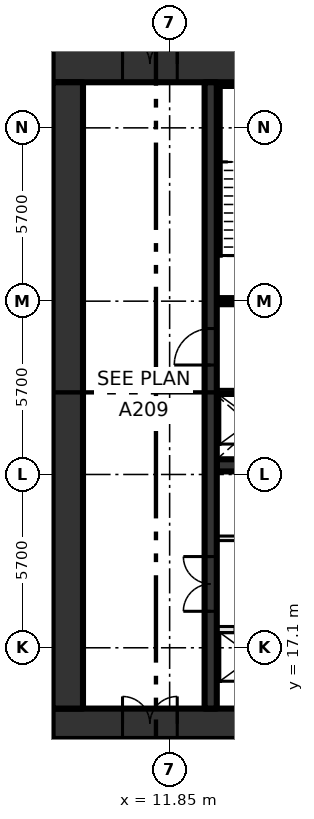
"""IFC4 building model, lengths in metres.
Left out: names, types, materials, properties, quantities, classifications, styles, units other than length and angle.
Written with IfcOpenShell. Run it as: python <this file> out.ifc"""

import sys

from ifc_helpers import new_model, si_unit, direction, frame, frame_2d, origin, place, context, subcontext, project, spatial, rectangle, extrude, element, fill, save


model = new_model("IFC4")
c1 = context("Model", 3, precision=1e-05, world=origin(), true_north=direction((0.0, 1.0)))
c2 = subcontext(c1, "Body", "Model", "MODEL_VIEW")
j1 = project(units=[si_unit("LENGTHUNIT", "METRE"), si_unit("PLANEANGLEUNIT", "RADIAN")], contexts=[c1])
p1 = place(None, origin())
s1 = spatial("IfcSite", under=j1, at=p1, CompositionType="ELEMENT")
p2 = place(p1, origin())
s2 = spatial("IfcBuilding", under=s1, at=p2, CompositionType="ELEMENT")
p3 = place(p2, frame((0.0, 0.0, 33.0)))
s3 = spatial("IfcBuildingStorey", under=s2, at=p3, CompositionType="ELEMENT", Elevation=33.0)
p4 = place(p3, frame((8.0, 14.6, -0.45), z_axis=(0.0, 0.0, 1.0), x_axis=(1.0, 0.0, 0.0)))
e1 = element("IfcWall", 1, at=p4, inside=s3, PredefinedType="SHEAR", context=c2, shape_type="SweptSolid", body=[
    extrude(rectangle(XDim=22.8, YDim=1.0, at=frame_2d((11.4, 0.0))), origin(), (0.0, 0.0, 1.0), 4.35),
])
p5 = place(p4, frame((2.3, 0.0, 0.45)))
e2 = element("IfcOpeningElement", 2, at=p5, cuts=e1, PredefinedType="OPENING", context=c2, shape_type="SweptSolid", body=[
    extrude(rectangle(XDim=1.8, YDim=2.1, at=frame_2d((0.9, 1.05))), frame((0.0, 0.51, 0.0), z_axis=(0.0, -1.0, 0.0), x_axis=(1.0, 0.0, 0.0)), (0.0, 0.0, 1.0), 1.02),
])
p6 = place(p3, frame((8.0, 36.3, -0.45), z_axis=(0.0, 0.0, 1.0), x_axis=(1.0, 0.0, 0.0)))
e3 = element("IfcWall", 3, at=p6, inside=s3, PredefinedType="SHEAR", context=c2, shape_type="SweptSolid", body=[
    extrude(rectangle(XDim=22.8, YDim=1.2, at=frame_2d((11.4, 0.0))), origin(), (0.0, 0.0, 1.0), 4.35),
])
p7 = place(p6, frame((2.3, 0.0, 0.45)))
e4 = element("IfcOpeningElement", 4, at=p7, cuts=e3, PredefinedType="OPENING", context=c2, shape_type="SweptSolid", body=[
    extrude(rectangle(XDim=1.8, YDim=2.1, at=frame_2d((0.9, 1.05))), frame((0.0, 0.61, 0.0), z_axis=(0.0, -1.0, 0.0), x_axis=(1.0, 0.0, 0.0)), (0.0, 0.0, 1.0), 1.22),
])
p8 = place(p3, frame((8.5, 15.1, -0.45), z_axis=(0.0, 0.0, 1.0), x_axis=(0.0, 1.0, 0.0)))
e5 = element("IfcWall", 5, at=p8, inside=s3, PredefinedType="SHEAR", context=c2, shape_type="SweptSolid", body=[
    extrude(rectangle(XDim=20.6, YDim=1.0, at=frame_2d((10.3, 0.0))), origin(), (0.0, 0.0, 1.0), 4.35),
])
p9 = place(p3, frame((13.4, 17.7, 0.0), z_axis=(0.0, 0.0, 1.0), x_axis=(1.0, 0.0, 0.0)))
e6 = element("IfcWall", 6, at=p9, inside=s3, PredefinedType="SOLIDWALL", context=c2, shape_type="SweptSolid", body=[
    extrude(rectangle(XDim=13.4, YDim=0.2, at=frame_2d((6.7, 0.0))), origin(), (0.0, 0.0, 1.0), 3.9),
])
p10 = place(p9, frame((0.6, 0.0, 0.0)))
e7 = element("IfcOpeningElement", 7, at=p10, cuts=e6, PredefinedType="OPENING", context=c2, shape_type="SweptSolid", body=[
    extrude(rectangle(XDim=1.1, YDim=2.1, at=frame_2d((0.55, 1.05))), frame((0.0, 0.11, 0.0), z_axis=(0.0, -1.0, 0.0), x_axis=(1.0, 0.0, 0.0)), (0.0, 0.0, 1.0), 0.22),
])
p11 = place(p9, frame((3.3, 0.0, 0.0)))
e8 = element("IfcOpeningElement", 8, at=p11, cuts=e6, PredefinedType="OPENING", context=c2, shape_type="SweptSolid", body=[
    extrude(rectangle(XDim=1.1, YDim=2.1, at=frame_2d((0.55, 1.05))), frame((0.0, 0.11, 0.0), z_axis=(0.0, -1.0, 0.0), x_axis=(1.0, 0.0, 0.0)), (0.0, 0.0, 1.0), 0.22),
])
p12 = place(p9, frame((6.0, 0.0, 0.0)))
e9 = element("IfcOpeningElement", 9, at=p12, cuts=e6, PredefinedType="OPENING", context=c2, shape_type="SweptSolid", body=[
    extrude(rectangle(XDim=1.1, YDim=2.1, at=frame_2d((0.55, 1.05))), frame((0.0, 0.11, 0.0), z_axis=(0.0, -1.0, 0.0), x_axis=(1.0, 0.0, 0.0)), (0.0, 0.0, 1.0), 0.22),
])
p13 = place(p9, frame((8.7, 0.0, 0.0)))
e10 = element("IfcOpeningElement", 10, at=p13, cuts=e6, PredefinedType="OPENING", context=c2, shape_type="SweptSolid", body=[
    extrude(rectangle(XDim=1.1, YDim=2.1, at=frame_2d((0.55, 1.05))), frame((0.0, 0.11, 0.0), z_axis=(0.0, -1.0, 0.0), x_axis=(1.0, 0.0, 0.0)), (0.0, 0.0, 1.0), 0.22),
])
p14 = place(p9, frame((11.4, 0.0, 0.0)))
e11 = element("IfcOpeningElement", 11, at=p14, cuts=e6, PredefinedType="OPENING", context=c2, shape_type="SweptSolid", body=[
    extrude(rectangle(XDim=1.1, YDim=2.1, at=frame_2d((0.55, 1.05))), frame((0.0, 0.11, 0.0), z_axis=(0.0, -1.0, 0.0), x_axis=(1.0, 0.0, 0.0)), (0.0, 0.0, 1.0), 0.22),
])
p15 = place(p3, frame((13.4, 20.7, 0.0), z_axis=(0.0, 0.0, 1.0), x_axis=(1.0, 0.0, 0.0)))
e12 = element("IfcWall", 12, at=p15, inside=s3, PredefinedType="PARTITIONING", context=c2, shape_type="SweptSolid", body=[
    extrude(rectangle(XDim=13.4, YDim=0.15, at=frame_2d((6.7, 0.0))), origin(), (0.0, 0.0, 1.0), 3.9),
])
p16 = place(p15, frame((2.05, 0.0, 0.0)))
e13 = element("IfcOpeningElement", 13, at=p16, cuts=e12, PredefinedType="OPENING", context=c2, shape_type="SweptSolid", body=[
    extrude(rectangle(XDim=0.9, YDim=2.1, at=frame_2d((0.45, 1.05))), frame((0.0, 0.085, 0.0), z_axis=(0.0, -1.0, 0.0), x_axis=(1.0, 0.0, 0.0)), (0.0, 0.0, 1.0), 0.17),
])
p17 = place(p15, frame((8.8, 0.0, 0.0)))
e14 = element("IfcOpeningElement", 14, at=p17, cuts=e12, PredefinedType="OPENING", context=c2, shape_type="SweptSolid", body=[
    extrude(rectangle(XDim=0.9, YDim=2.1, at=frame_2d((0.45, 1.05))), frame((0.0, 0.085, 0.0), z_axis=(0.0, -1.0, 0.0), x_axis=(1.0, 0.0, 0.0)), (0.0, 0.0, 1.0), 0.17),
])
p18 = place(p3, frame((13.4, 23.1, 0.0), z_axis=(0.0, 0.0, 1.0), x_axis=(1.0, 0.0, 0.0)))
e15 = element("IfcWall", 15, at=p18, inside=s3, PredefinedType="SHEAR", context=c2, shape_type="SweptSolid", body=[
    extrude(rectangle(XDim=16.4, YDim=0.4, at=frame_2d((8.2, 0.0))), origin(), (0.0, 0.0, 1.0), 3.9),
])
p19 = place(p3, frame((13.4, 25.5, 0.0), z_axis=(0.0, 0.0, 1.0), x_axis=(1.0, 0.0, 0.0)))
e16 = element("IfcWall", 16, at=p19, inside=s3, PredefinedType="SOLIDWALL", context=c2, shape_type="SweptSolid", body=[
    extrude(rectangle(XDim=16.4, YDim=0.2, at=frame_2d((8.2, 0.0))), origin(), (0.0, 0.0, 1.0), 3.9),
])
p20 = place(p19, frame((0.6, 0.0, 0.0)))
e17 = element("IfcOpeningElement", 17, at=p20, cuts=e16, PredefinedType="OPENING", context=c2, shape_type="SweptSolid", body=[
    extrude(rectangle(XDim=1.1, YDim=2.1, at=frame_2d((0.55, 1.05))), frame((0.0, 0.11, 0.0), z_axis=(0.0, -1.0, 0.0), x_axis=(1.0, 0.0, 0.0)), (0.0, 0.0, 1.0), 0.22),
])
p21 = place(p19, frame((3.3, 0.0, 0.0)))
e18 = element("IfcOpeningElement", 18, at=p21, cuts=e16, PredefinedType="OPENING", context=c2, shape_type="SweptSolid", body=[
    extrude(rectangle(XDim=1.1, YDim=2.1, at=frame_2d((0.55, 1.05))), frame((0.0, 0.11, 0.0), z_axis=(0.0, -1.0, 0.0), x_axis=(1.0, 0.0, 0.0)), (0.0, 0.0, 1.0), 0.22),
])
p22 = place(p19, frame((6.0, 0.0, 0.0)))
e19 = element("IfcOpeningElement", 19, at=p22, cuts=e16, PredefinedType="OPENING", context=c2, shape_type="SweptSolid", body=[
    extrude(rectangle(XDim=1.1, YDim=2.1, at=frame_2d((0.55, 1.05))), frame((0.0, 0.11, 0.0), z_axis=(0.0, -1.0, 0.0), x_axis=(1.0, 0.0, 0.0)), (0.0, 0.0, 1.0), 0.22),
])
p23 = place(p19, frame((8.7, 0.0, 0.0)))
e20 = element("IfcOpeningElement", 20, at=p23, cuts=e16, PredefinedType="OPENING", context=c2, shape_type="SweptSolid", body=[
    extrude(rectangle(XDim=1.1, YDim=2.1, at=frame_2d((0.55, 1.05))), frame((0.0, 0.11, 0.0), z_axis=(0.0, -1.0, 0.0), x_axis=(1.0, 0.0, 0.0)), (0.0, 0.0, 1.0), 0.22),
])
p24 = place(p3, frame((13.4, 28.5, 0.0), z_axis=(0.0, 0.0, 1.0), x_axis=(1.0, 0.0, 0.0)))
e21 = element("IfcWall", 21, at=p24, inside=s3, PredefinedType="SOLIDWALL", context=c2, shape_type="SweptSolid", body=[
    extrude(rectangle(XDim=6.7, YDim=0.2, at=frame_2d((3.35, 0.0))), origin(), (0.0, 0.0, 1.0), 3.9),
])
p25 = place(p24, frame((0.9, 0.0, 0.0)))
e22 = element("IfcOpeningElement", 22, at=p25, cuts=e21, PredefinedType="OPENING", context=c2, shape_type="SweptSolid", body=[
    extrude(rectangle(XDim=1.2, YDim=2.1, at=frame_2d((0.6, 1.05))), frame((0.0, 0.11, 0.0), z_axis=(0.0, -1.0, 0.0), x_axis=(1.0, 0.0, 0.0)), (0.0, 0.0, 1.0), 0.22),
])
p26 = place(p24, frame((3.7, 0.0, 0.0)))
e23 = element("IfcOpeningElement", 23, at=p26, cuts=e21, PredefinedType="OPENING", context=c2, shape_type="SweptSolid", body=[
    extrude(rectangle(XDim=1.1, YDim=2.1, at=frame_2d((0.55, 1.05))), frame((0.0, 0.11, 0.0), z_axis=(0.0, -1.0, 0.0), x_axis=(1.0, 0.0, 0.0)), (0.0, 0.0, 1.0), 0.22),
])
p27 = place(p3, frame((13.2, 15.1, 0.0), z_axis=(0.0, 0.0, 1.0), x_axis=(0.0, 1.0, 0.0)))
e24 = element("IfcWall", 24, at=p27, inside=s3, PredefinedType="SHEAR", context=c2, shape_type="SweptSolid", body=[
    extrude(rectangle(XDim=20.6, YDim=0.4, at=frame_2d((10.3, 0.0))), origin(), (0.0, 0.0, 1.0), 3.9),
])
p28 = place(p27, frame((3.2, 0.0, 0.0)))
e25 = element("IfcOpeningElement", 25, at=p28, cuts=e24, PredefinedType="OPENING", context=c2, shape_type="SweptSolid", body=[
    extrude(rectangle(XDim=1.8, YDim=2.1, at=frame_2d((0.9, 1.05))), frame((0.0, 0.21, 0.0), z_axis=(0.0, -1.0, 0.0), x_axis=(1.0, 0.0, 0.0)), (0.0, 0.0, 1.0), 0.42),
])
p29 = place(p27, frame((11.3, 0.0, 0.0)))
e26 = element("IfcOpeningElement", 26, at=p29, cuts=e24, PredefinedType="OPENING", context=c2, shape_type="SweptSolid", body=[
    extrude(rectangle(XDim=1.2, YDim=2.1, at=frame_2d((0.6, 1.05))), frame((0.0, 0.21, 0.0), z_axis=(0.0, -1.0, 0.0), x_axis=(1.0, 0.0, 0.0)), (0.0, 0.0, 1.0), 0.42),
])
p30 = place(p3, frame((11.707, -11.659, 0.0), z_axis=(0.0, 0.0, 1.0), x_axis=(-0.61565155533, 0.788018503856, 0.0)))
e27 = element("IfcWall", 27, at=p30, inside=s3, PredefinedType="PARAPET", context=c2, shape_type="SweptSolid", body=[
    extrude(rectangle(XDim=32.79, YDim=0.25, at=frame_2d((16.395, 0.0))), origin(), (0.0, 0.0, 1.0), 1.2),
])
p31 = place(p3, frame((12.9, 10.078, 0.0), z_axis=(0.0, 0.0, 1.0), x_axis=(0.0, 1.0, 0.0)))
e28 = element("IfcWall", 28, at=p31, inside=s3, PredefinedType="PARTITIONING", context=c2, shape_type="SweptSolid", body=[
    extrude(rectangle(XDim=4.022, YDim=0.1, at=frame_2d((2.011, 0.0))), origin(), (0.0, 0.0, 1.0), 3.9),
])
p32 = place(p28, origin())
e29 = element("IfcDoor", 29, at=p32, inside=s3, OperationType="DOUBLE_DOOR_SINGLE_SWING", PredefinedType="DOOR", context=c2, shape_type="SweptSolid", body=[
    extrude(rectangle(XDim=1.8, YDim=2.1, at=frame_2d((0.9, 1.05))), frame((0.0, 0.025, 0.0), z_axis=(0.0, -1.0, 0.0), x_axis=(1.0, 0.0, 0.0)), (0.0, 0.0, 1.0), 0.05),
])
fill(e25, e29)
p33 = place(p29, origin())
e30 = element("IfcDoor", 30, at=p33, inside=s3, OperationType="SINGLE_SWING_LEFT", PredefinedType="DOOR", context=c2, shape_type="SweptSolid", body=[
    extrude(rectangle(XDim=1.2, YDim=2.1, at=frame_2d((0.6, 1.05))), frame((0.0, 0.025, 0.0), z_axis=(0.0, -1.0, 0.0), x_axis=(1.0, 0.0, 0.0)), (0.0, 0.0, 1.0), 0.05),
])
fill(e26, e30)
p34 = place(p7, origin())
e31 = element("IfcDoor", 31, at=p34, inside=s3, OperationType="DOUBLE_DOOR_SINGLE_SWING", PredefinedType="DOOR", context=c2, shape_type="SweptSolid", body=[
    extrude(rectangle(XDim=1.8, YDim=2.1, at=frame_2d((0.9, 1.05))), frame((0.0, 0.025, 0.0), z_axis=(0.0, -1.0, 0.0), x_axis=(1.0, 0.0, 0.0)), (0.0, 0.0, 1.0), 0.05),
])
fill(e4, e31)
p35 = place(p5, origin())
e32 = element("IfcDoor", 32, at=p35, inside=s3, OperationType="DOUBLE_DOOR_SINGLE_SWING", PredefinedType="DOOR", context=c2, shape_type="SweptSolid", body=[
    extrude(rectangle(XDim=1.8, YDim=2.1, at=frame_2d((0.9, 1.05))), frame((0.0, 0.025, 0.0), z_axis=(0.0, -1.0, 0.0), x_axis=(1.0, 0.0, 0.0)), (0.0, 0.0, 1.0), 0.05),
])
fill(e2, e32)
save(model, sys.argv[1])
